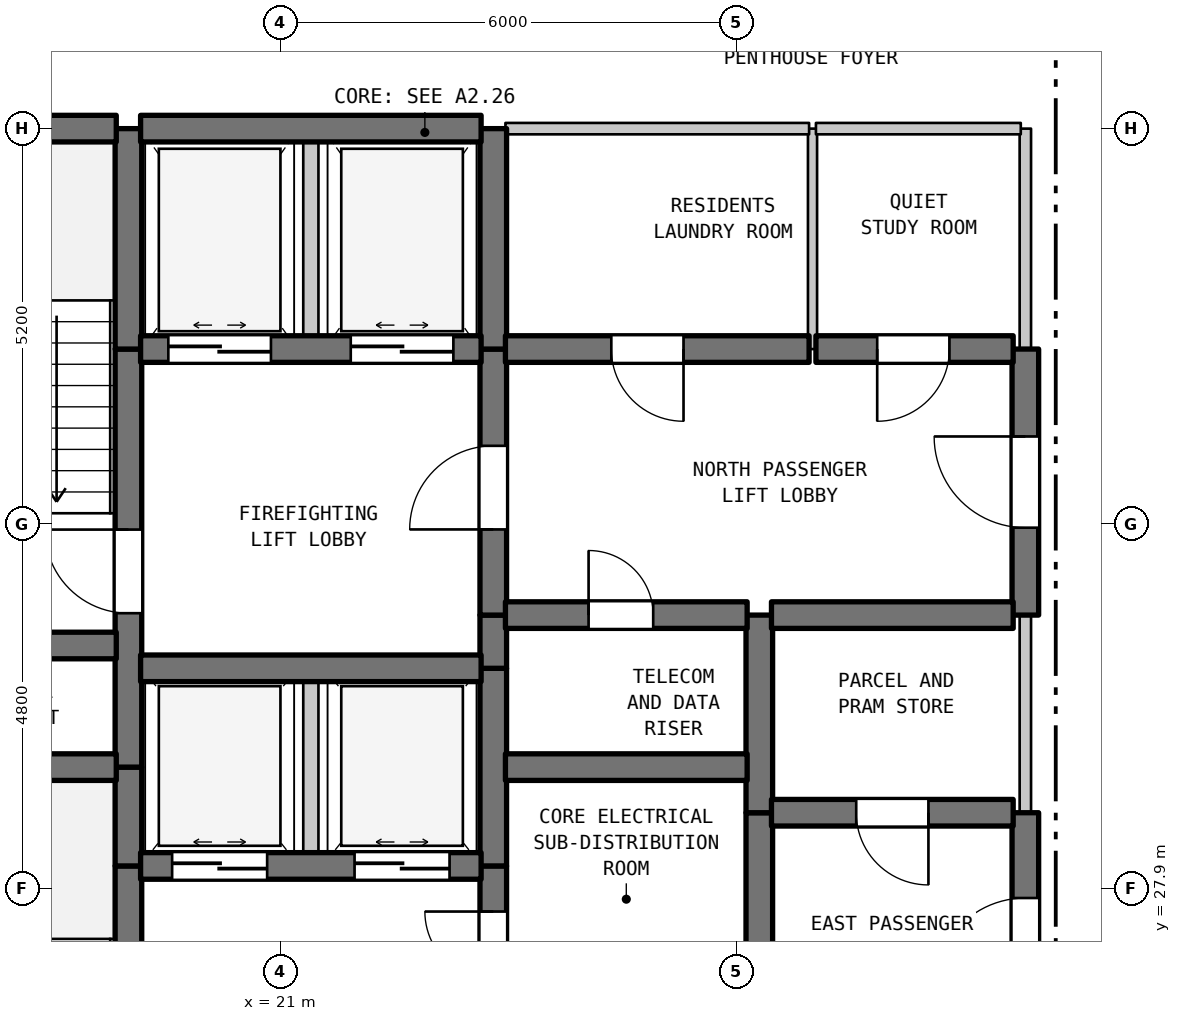
"""IFC4 building model, lengths in metres.
Left out: names, types, materials, properties, quantities, classifications, styles, units other than length and angle.
Written with IfcOpenShell. Run it as: python <this file> out.ifc"""

import sys

from ifc_helpers import new_model, si_unit, direction, frame, frame_2d, origin, place, context, subcontext, project, spatial, rectangle, extrude, element, fill, save


model = new_model("IFC4")
c1 = context("Model", 3, precision=1e-05, world=origin(), true_north=direction((0.0, 1.0)))
c2 = subcontext(c1, "Body", "Model", "MODEL_VIEW")
j1 = project(units=[si_unit("LENGTHUNIT", "METRE"), si_unit("PLANEANGLEUNIT", "RADIAN")], contexts=[c1])
p1 = place(None, origin())
s1 = spatial("IfcSite", under=j1, at=p1, CompositionType="ELEMENT")
p2 = place(p1, origin())
s2 = spatial("IfcBuilding", under=s1, at=p2, CompositionType="ELEMENT")
p3 = place(p2, frame((0.0, 0.0, 288.0)))
s3 = spatial("IfcBuildingStorey", under=s2, at=p3, CompositionType="ELEMENT", Elevation=288.0)
p4 = place(p3, frame((19.0, 22.7, 0.0), z_axis=(0.0, 0.0, 1.0), x_axis=(0.0, 1.0, 0.0)))
e1 = element("IfcWall", 1, at=p4, inside=s3, PredefinedType="SHEAR", context=c2, shape_type="SweptSolid", body=[
    extrude(rectangle(XDim=5.5, YDim=0.35, at=frame_2d((2.75, 0.0))), origin(), (0.0, 0.0, 1.0), 3.39),
])
p5 = place(p4, frame((0.631, 0.0, 0.0)))
e2 = element("IfcOpeningElement", 2, at=p5, cuts=e1, PredefinedType="OPENING", context=c2, shape_type="SweptSolid", body=[
    extrude(rectangle(XDim=1.1, YDim=2.15, at=frame_2d((0.55, 1.075))), frame((0.0, 0.185, 0.0), z_axis=(0.0, -1.0, 0.0), x_axis=(1.0, 0.0, 0.0)), (0.0, 0.0, 1.0), 0.37),
])
p6 = place(p3, frame((19.0, 28.2, 0.0), z_axis=(0.0, 0.0, 1.0), x_axis=(0.0, 1.0, 0.0)))
e3 = element("IfcWall", 3, at=p6, inside=s3, PredefinedType="SHEAR", context=c2, shape_type="SweptSolid", body=[
    extrude(rectangle(XDim=1.3, YDim=0.35, at=frame_2d((0.65, 0.0))), origin(), (0.0, 0.0, 1.0), 3.39),
])
p7 = place(p3, frame((19.0, 29.5, 0.0), z_axis=(0.0, 0.0, 1.0), x_axis=(0.0, 1.0, 0.0)))
e4 = element("IfcWall", 4, at=p7, inside=s3, PredefinedType="SHEAR", context=c2, shape_type="SweptSolid", body=[
    extrude(rectangle(XDim=5.5, YDim=0.35, at=frame_2d((2.75, 0.0))), origin(), (0.0, 0.0, 1.0), 3.39),
])
p8 = place(p7, frame((2.025, 0.0, 0.0)))
e5 = element("IfcOpeningElement", 5, at=p8, cuts=e4, PredefinedType="OPENING", context=c2, shape_type="SweptSolid", body=[
    extrude(rectangle(XDim=1.1, YDim=2.15, at=frame_2d((0.55, 1.075))), frame((0.0, 0.185, 0.0), z_axis=(0.0, -1.0, 0.0), x_axis=(1.0, 0.0, 0.0)), (0.0, 0.0, 1.0), 0.37),
])
p9 = place(p3, frame((19.0, 35.0, 0.0), z_axis=(0.0, 0.0, 1.0), x_axis=(0.0, 1.0, 0.0)))
e6 = element("IfcWall", 6, at=p9, inside=s3, PredefinedType="SHEAR", context=c2, shape_type="SweptSolid", body=[
    extrude(rectangle(XDim=2.9, YDim=0.35, at=frame_2d((1.45, 0.0))), origin(), (0.0, 0.0, 1.0), 3.39),
])
p10 = place(p3, frame((21.4, 28.2, 0.0), z_axis=(0.0, 0.0, 1.0), x_axis=(0.0, 1.0, 0.0)))
e7 = element("IfcWall", 7, at=p10, inside=s3, PredefinedType="STANDARD", context=c2, shape_type="SweptSolid", body=[
    extrude(rectangle(XDim=2.6, YDim=0.2, at=frame_2d((1.3, 0.0))), origin(), (0.0, 0.0, 1.0), 3.39),
])
p11 = place(p3, frame((21.4, 35.0, 0.0), z_axis=(0.0, 0.0, 1.0), x_axis=(0.0, 1.0, 0.0)))
e8 = element("IfcWall", 8, at=p11, inside=s3, PredefinedType="STANDARD", context=c2, shape_type="SweptSolid", body=[
    extrude(rectangle(XDim=2.9, YDim=0.2, at=frame_2d((1.45, 0.0))), origin(), (0.0, 0.0, 1.0), 3.39),
])
p12 = place(p3, frame((23.8, 26.1, 0.0), z_axis=(0.0, 0.0, 1.0), x_axis=(0.0, 1.0, 0.0)))
e9 = element("IfcWall", 9, at=p12, inside=s3, PredefinedType="SHEAR", context=c2, shape_type="SweptSolid", body=[
    extrude(rectangle(XDim=2.1, YDim=0.35, at=frame_2d((1.05, 0.0))), origin(), (0.0, 0.0, 1.0), 3.39),
])
p13 = place(p12, frame((0.6, 0.0, 0.0)))
e10 = element("IfcOpeningElement", 10, at=p13, cuts=e9, PredefinedType="OPENING", context=c2, shape_type="SweptSolid", body=[
    extrude(rectangle(XDim=0.9, YDim=2.15, at=frame_2d((0.45, 1.075))), frame((0.0, 0.185, 0.0), z_axis=(0.0, -1.0, 0.0), x_axis=(1.0, 0.0, 0.0)), (0.0, 0.0, 1.0), 0.37),
])
p14 = place(p3, frame((23.8, 28.2, 0.0), z_axis=(0.0, 0.0, 1.0), x_axis=(0.0, 1.0, 0.0)))
e11 = element("IfcWall", 11, at=p14, inside=s3, PredefinedType="SHEAR", context=c2, shape_type="SweptSolid", body=[
    extrude(rectangle(XDim=2.6, YDim=0.35, at=frame_2d((1.3, 0.0))), origin(), (0.0, 0.0, 1.0), 3.39),
])
p15 = place(p3, frame((23.8, 30.8, 0.0), z_axis=(0.0, 0.0, 1.0), x_axis=(0.0, 1.0, 0.0)))
e12 = element("IfcWall", 12, at=p15, inside=s3, PredefinedType="SHEAR", context=c2, shape_type="SweptSolid", body=[
    extrude(rectangle(XDim=0.7, YDim=0.35, at=frame_2d((0.35, 0.0))), origin(), (0.0, 0.0, 1.0), 3.39),
])
p16 = place(p3, frame((23.8, 31.5, 0.0), z_axis=(0.0, 0.0, 1.0), x_axis=(0.0, 1.0, 0.0)))
e13 = element("IfcWall", 13, at=p16, inside=s3, PredefinedType="SHEAR", context=c2, shape_type="SweptSolid", body=[
    extrude(rectangle(XDim=3.5, YDim=0.35, at=frame_2d((1.75, 0.0))), origin(), (0.0, 0.0, 1.0), 3.39),
])
p17 = place(p16, frame((1.127, 0.0, 0.0)))
e14 = element("IfcOpeningElement", 14, at=p17, cuts=e13, PredefinedType="OPENING", context=c2, shape_type="SweptSolid", body=[
    extrude(rectangle(XDim=1.1, YDim=2.15, at=frame_2d((0.55, 1.075))), frame((0.0, 0.185, 0.0), z_axis=(0.0, -1.0, 0.0), x_axis=(1.0, 0.0, 0.0)), (0.0, 0.0, 1.0), 0.37),
])
p18 = place(p3, frame((23.8, 35.0, 0.0), z_axis=(0.0, 0.0, 1.0), x_axis=(0.0, 1.0, 0.0)))
e15 = element("IfcWall", 15, at=p18, inside=s3, PredefinedType="SHEAR", context=c2, shape_type="SweptSolid", body=[
    extrude(rectangle(XDim=2.9, YDim=0.35, at=frame_2d((1.45, 0.0))), origin(), (0.0, 0.0, 1.0), 3.39),
])
p19 = place(p3, frame((27.3, 26.1, 0.0), z_axis=(0.0, 0.0, 1.0), x_axis=(0.0, 1.0, 0.0)))
e16 = element("IfcWall", 16, at=p19, inside=s3, PredefinedType="SHEAR", context=c2, shape_type="SweptSolid", body=[
    extrude(rectangle(XDim=2.8, YDim=0.35, at=frame_2d((1.4, 0.0))), origin(), (0.0, 0.0, 1.0), 3.39),
])
p20 = place(p3, frame((27.3, 28.9, 0.0), z_axis=(0.0, 0.0, 1.0), x_axis=(0.0, 1.0, 0.0)))
e17 = element("IfcWall", 17, at=p20, inside=s3, PredefinedType="SHEAR", context=c2, shape_type="SweptSolid", body=[
    extrude(rectangle(XDim=2.6, YDim=0.35, at=frame_2d((1.3, 0.0))), origin(), (0.0, 0.0, 1.0), 3.39),
])
p21 = place(p3, frame((28.0, 35.0, 0.0), z_axis=(0.0, 0.0, 1.0), x_axis=(0.0, 1.0, 0.0)))
e18 = element("IfcWall", 18, at=p21, inside=s3, PredefinedType="PARTITIONING", context=c2, shape_type="SweptSolid", body=[
    extrude(rectangle(XDim=2.9, YDim=0.12, at=frame_2d((1.45, 0.0))), origin(), (0.0, 0.0, 1.0), 3.39),
])
p22 = place(p3, frame((30.8, 25.6, 0.0), z_axis=(0.0, 0.0, 1.0), x_axis=(0.0, 1.0, 0.0)))
e19 = element("IfcWall", 19, at=p22, inside=s3, PredefinedType="SHEAR", context=c2, shape_type="SweptSolid", body=[
    extrude(rectangle(XDim=3.3, YDim=0.35, at=frame_2d((1.65, 0.0))), origin(), (0.0, 0.0, 1.0), 3.39),
])
p23 = place(p22, frame((0.978, 0.0, 0.0)))
e20 = element("IfcOpeningElement", 20, at=p23, cuts=e19, PredefinedType="OPENING", context=c2, shape_type="SweptSolid", body=[
    extrude(rectangle(XDim=1.2, YDim=2.2, at=frame_2d((0.6, 1.1))), frame((0.0, 0.185, 0.0), z_axis=(0.0, -1.0, 0.0), x_axis=(1.0, 0.0, 0.0)), (0.0, 0.0, 1.0), 0.37),
])
p24 = place(p3, frame((30.8, 28.9, 0.0), z_axis=(0.0, 0.0, 1.0), x_axis=(0.0, 1.0, 0.0)))
e21 = element("IfcWall", 21, at=p24, inside=s3, PredefinedType="STANDARD", context=c2, shape_type="SweptSolid", body=[
    extrude(rectangle(XDim=2.6, YDim=0.15, at=frame_2d((1.3, 0.0))), origin(), (0.0, 0.0, 1.0), 3.39),
])
p25 = place(p3, frame((30.8, 31.5, 0.0), z_axis=(0.0, 0.0, 1.0), x_axis=(0.0, 1.0, 0.0)))
e22 = element("IfcWall", 22, at=p25, inside=s3, PredefinedType="SHEAR", context=c2, shape_type="SweptSolid", body=[
    extrude(rectangle(XDim=3.5, YDim=0.35, at=frame_2d((1.75, 0.0))), origin(), (0.0, 0.0, 1.0), 3.39),
])
p26 = place(p25, frame((1.15, 0.0, 0.0)))
e23 = element("IfcOpeningElement", 23, at=p26, cuts=e22, PredefinedType="OPENING", context=c2, shape_type="SweptSolid", body=[
    extrude(rectangle(XDim=1.2, YDim=2.2, at=frame_2d((0.6, 1.1))), frame((0.0, 0.185, 0.0), z_axis=(0.0, -1.0, 0.0), x_axis=(1.0, 0.0, 0.0)), (0.0, 0.0, 1.0), 0.37),
])
p27 = place(p3, frame((30.8, 35.0, 0.0), z_axis=(0.0, 0.0, 1.0), x_axis=(0.0, 1.0, 0.0)))
e24 = element("IfcWall", 24, at=p27, inside=s3, PredefinedType="STANDARD", context=c2, shape_type="SweptSolid", body=[
    extrude(rectangle(XDim=2.9, YDim=0.15, at=frame_2d((1.45, 0.0))), origin(), (0.0, 0.0, 1.0), 3.39),
])
p28 = place(p3, frame((19.16, 28.2, 0.0), z_axis=(0.0, 0.0, 1.0), x_axis=(1.0, 0.0, 0.0)))
e25 = element("IfcWall", 25, at=p28, inside=s3, PredefinedType="SHEAR", context=c2, shape_type="SweptSolid", body=[
    extrude(rectangle(XDim=4.48, YDim=0.35, at=frame_2d((2.24, 0.0))), origin(), (0.0, 0.0, 1.0), 3.39),
])
p29 = place(p28, frame((0.415, 0.0, 0.0)))
e26 = element("IfcOpeningElement", 26, at=p29, cuts=e25, PredefinedType="OPENING", context=c2, shape_type="SweptSolid", body=[
    extrude(rectangle(XDim=1.25, YDim=2.2, at=frame_2d((0.625, 1.1))), frame((0.0, 0.185, 0.0), z_axis=(0.0, -1.0, 0.0), x_axis=(1.0, 0.0, 0.0)), (0.0, 0.0, 1.0), 0.37),
])
p30 = place(p28, frame((2.815, 0.0, 0.0)))
e27 = element("IfcOpeningElement", 27, at=p30, cuts=e25, PredefinedType="OPENING", context=c2, shape_type="SweptSolid", body=[
    extrude(rectangle(XDim=1.25, YDim=2.2, at=frame_2d((0.625, 1.1))), frame((0.0, 0.185, 0.0), z_axis=(0.0, -1.0, 0.0), x_axis=(1.0, 0.0, 0.0)), (0.0, 0.0, 1.0), 0.37),
])
p31 = place(p3, frame((27.46, 28.9, 0.0), z_axis=(0.0, 0.0, 1.0), x_axis=(1.0, 0.0, 0.0)))
e28 = element("IfcWall", 28, at=p31, inside=s3, PredefinedType="SHEAR", context=c2, shape_type="SweptSolid", body=[
    extrude(rectangle(XDim=3.18, YDim=0.35, at=frame_2d((1.59, 0.0))), origin(), (0.0, 0.0, 1.0), 3.39),
])
p32 = place(p31, frame((1.115, 0.0, 0.0)))
e29 = element("IfcOpeningElement", 29, at=p32, cuts=e28, PredefinedType="OPENING", context=c2, shape_type="SweptSolid", body=[
    extrude(rectangle(XDim=0.95, YDim=2.15, at=frame_2d((0.475, 1.075))), frame((0.0, 0.185, 0.0), z_axis=(0.0, -1.0, 0.0), x_axis=(1.0, 0.0, 0.0)), (0.0, 0.0, 1.0), 0.37),
])
p33 = place(p3, frame((15.16, 29.5, 0.0), z_axis=(0.0, 0.0, 1.0), x_axis=(1.0, 0.0, 0.0)))
e30 = element("IfcWall", 30, at=p33, inside=s3, PredefinedType="SHEAR", context=c2, shape_type="SweptSolid", body=[
    extrude(rectangle(XDim=3.68, YDim=0.35, at=frame_2d((1.84, 0.0))), origin(), (0.0, 0.0, 1.0), 3.39),
])
p34 = place(p3, frame((23.96, 29.5, 0.0), z_axis=(0.0, 0.0, 1.0), x_axis=(1.0, 0.0, 0.0)))
e31 = element("IfcWall", 31, at=p34, inside=s3, PredefinedType="SHEAR", context=c2, shape_type="SweptSolid", body=[
    extrude(rectangle(XDim=3.18, YDim=0.35, at=frame_2d((1.59, 0.0))), origin(), (0.0, 0.0, 1.0), 3.39),
])
p35 = place(p3, frame((19.16, 30.8, 0.0), z_axis=(0.0, 0.0, 1.0), x_axis=(1.0, 0.0, 0.0)))
e32 = element("IfcWall", 32, at=p35, inside=s3, PredefinedType="SHEAR", context=c2, shape_type="SweptSolid", body=[
    extrude(rectangle(XDim=4.48, YDim=0.35, at=frame_2d((2.24, 0.0))), origin(), (0.0, 0.0, 1.0), 3.39),
])
p36 = place(p3, frame((15.16, 31.1, 0.0), z_axis=(0.0, 0.0, 1.0), x_axis=(1.0, 0.0, 0.0)))
e33 = element("IfcWall", 33, at=p36, inside=s3, PredefinedType="SHEAR", context=c2, shape_type="SweptSolid", body=[
    extrude(rectangle(XDim=3.68, YDim=0.35, at=frame_2d((1.84, 0.0))), origin(), (0.0, 0.0, 1.0), 3.39),
])
p37 = place(p3, frame((23.96, 31.5, 0.0), z_axis=(0.0, 0.0, 1.0), x_axis=(1.0, 0.0, 0.0)))
e34 = element("IfcWall", 34, at=p37, inside=s3, PredefinedType="SHEAR", context=c2, shape_type="SweptSolid", body=[
    extrude(rectangle(XDim=3.18, YDim=0.35, at=frame_2d((1.59, 0.0))), origin(), (0.0, 0.0, 1.0), 3.39),
])
p38 = place(p37, frame((1.094, 0.0, 0.0)))
e35 = element("IfcOpeningElement", 35, at=p38, cuts=e34, PredefinedType="OPENING", context=c2, shape_type="SweptSolid", body=[
    extrude(rectangle(XDim=0.85, YDim=2.1, at=frame_2d((0.425, 1.05))), frame((0.0, 0.185, 0.0), z_axis=(0.0, -1.0, 0.0), x_axis=(1.0, 0.0, 0.0)), (0.0, 0.0, 1.0), 0.37),
])
p39 = place(p3, frame((27.46, 31.5, 0.0), z_axis=(0.0, 0.0, 1.0), x_axis=(1.0, 0.0, 0.0)))
e36 = element("IfcWall", 36, at=p39, inside=s3, PredefinedType="SHEAR", context=c2, shape_type="SweptSolid", body=[
    extrude(rectangle(XDim=3.18, YDim=0.35, at=frame_2d((1.59, 0.0))), origin(), (0.0, 0.0, 1.0), 3.39),
])
p40 = place(p3, frame((19.16, 35.0, 0.0), z_axis=(0.0, 0.0, 1.0), x_axis=(1.0, 0.0, 0.0)))
e37 = element("IfcWall", 37, at=p40, inside=s3, PredefinedType="SHEAR", context=c2, shape_type="SweptSolid", body=[
    extrude(rectangle(XDim=4.48, YDim=0.35, at=frame_2d((2.24, 0.0))), origin(), (0.0, 0.0, 1.0), 3.39),
])
p41 = place(p40, frame((0.365, 0.0, 0.0)))
e38 = element("IfcOpeningElement", 38, at=p41, cuts=e37, PredefinedType="OPENING", context=c2, shape_type="SweptSolid", body=[
    extrude(rectangle(XDim=1.35, YDim=2.2, at=frame_2d((0.675, 1.1))), frame((0.0, 0.185, 0.0), z_axis=(0.0, -1.0, 0.0), x_axis=(1.0, 0.0, 0.0)), (0.0, 0.0, 1.0), 0.37),
])
p42 = place(p40, frame((2.765, 0.0, 0.0)))
e39 = element("IfcOpeningElement", 39, at=p42, cuts=e37, PredefinedType="OPENING", context=c2, shape_type="SweptSolid", body=[
    extrude(rectangle(XDim=1.35, YDim=2.2, at=frame_2d((0.675, 1.1))), frame((0.0, 0.185, 0.0), z_axis=(0.0, -1.0, 0.0), x_axis=(1.0, 0.0, 0.0)), (0.0, 0.0, 1.0), 0.37),
])
p43 = place(p3, frame((23.96, 35.0, 0.0), z_axis=(0.0, 0.0, 1.0), x_axis=(1.0, 0.0, 0.0)))
e40 = element("IfcWall", 40, at=p43, inside=s3, PredefinedType="SHEAR", context=c2, shape_type="SweptSolid", body=[
    extrude(rectangle(XDim=3.995, YDim=0.35, at=frame_2d((1.998, 0.0))), origin(), (0.0, 0.0, 1.0), 3.39),
])
p44 = place(p43, frame((1.393, 0.0, 0.0)))
e41 = element("IfcOpeningElement", 41, at=p44, cuts=e40, PredefinedType="OPENING", context=c2, shape_type="SweptSolid", body=[
    extrude(rectangle(XDim=0.95, YDim=2.15, at=frame_2d((0.475, 1.075))), frame((0.0, 0.185, 0.0), z_axis=(0.0, -1.0, 0.0), x_axis=(1.0, 0.0, 0.0)), (0.0, 0.0, 1.0), 0.37),
])
p45 = place(p3, frame((28.045, 35.0, 0.0), z_axis=(0.0, 0.0, 1.0), x_axis=(1.0, 0.0, 0.0)))
e42 = element("IfcWall", 42, at=p45, inside=s3, PredefinedType="SHEAR", context=c2, shape_type="SweptSolid", body=[
    extrude(rectangle(XDim=2.595, YDim=0.35, at=frame_2d((1.297, 0.0))), origin(), (0.0, 0.0, 1.0), 3.39),
])
p46 = place(p45, frame((0.806, 0.0, 0.0)))
e43 = element("IfcOpeningElement", 43, at=p46, cuts=e42, PredefinedType="OPENING", context=c2, shape_type="SweptSolid", body=[
    extrude(rectangle(XDim=0.95, YDim=2.15, at=frame_2d((0.475, 1.075))), frame((0.0, 0.185, 0.0), z_axis=(0.0, -1.0, 0.0), x_axis=(1.0, 0.0, 0.0)), (0.0, 0.0, 1.0), 0.37),
])
p47 = place(p3, frame((15.16, 37.9, 0.0), z_axis=(0.0, 0.0, 1.0), x_axis=(1.0, 0.0, 0.0)))
e44 = element("IfcWall", 44, at=p47, inside=s3, PredefinedType="SHEAR", context=c2, shape_type="SweptSolid", body=[
    extrude(rectangle(XDim=3.68, YDim=0.35, at=frame_2d((1.84, 0.0))), origin(), (0.0, 0.0, 1.0), 3.39),
])
p48 = place(p3, frame((19.16, 37.9, 0.0), z_axis=(0.0, 0.0, 1.0), x_axis=(1.0, 0.0, 0.0)))
e45 = element("IfcWall", 45, at=p48, inside=s3, PredefinedType="SHEAR", context=c2, shape_type="SweptSolid", body=[
    extrude(rectangle(XDim=4.48, YDim=0.35, at=frame_2d((2.24, 0.0))), origin(), (0.0, 0.0, 1.0), 3.39),
])
p49 = place(p3, frame((23.96, 37.9, 0.0), z_axis=(0.0, 0.0, 1.0), x_axis=(1.0, 0.0, 0.0)))
e46 = element("IfcWall", 46, at=p49, inside=s3, PredefinedType="STANDARD", context=c2, shape_type="SweptSolid", body=[
    extrude(rectangle(XDim=3.995, YDim=0.15, at=frame_2d((1.998, 0.0))), origin(), (0.0, 0.0, 1.0), 2.89),
])
p50 = place(p3, frame((28.045, 37.9, 0.0), z_axis=(0.0, 0.0, 1.0), x_axis=(1.0, 0.0, 0.0)))
e47 = element("IfcWall", 47, at=p50, inside=s3, PredefinedType="STANDARD", context=c2, shape_type="SweptSolid", body=[
    extrude(rectangle(XDim=2.695, YDim=0.15, at=frame_2d((1.348, 0.0))), origin(), (0.0, 0.0, 1.0), 2.89),
])
p51 = place(p8, origin())
e48 = element("IfcDoor", 48, at=p51, inside=s3, OperationType="SINGLE_SWING_RIGHT", PredefinedType="DOOR", context=c2, shape_type="SweptSolid", body=[
    extrude(rectangle(XDim=1.1, YDim=2.15, at=frame_2d((0.55, 1.075))), frame((0.0, 0.025, 0.0), z_axis=(0.0, -1.0, 0.0), x_axis=(1.0, 0.0, 0.0)), (0.0, 0.0, 1.0), 0.05),
])
fill(e5, e48)
p52 = place(p13, origin())
e49 = element("IfcDoor", 49, at=p52, inside=s3, OperationType="SINGLE_SWING_RIGHT", PredefinedType="DOOR", context=c2, shape_type="SweptSolid", body=[
    extrude(rectangle(XDim=0.9, YDim=2.15, at=frame_2d((0.45, 1.075))), frame((0.0, 0.025, 0.0), z_axis=(0.0, -1.0, 0.0), x_axis=(1.0, 0.0, 0.0)), (0.0, 0.0, 1.0), 0.05),
])
fill(e10, e49)
p53 = place(p17, origin())
e50 = element("IfcDoor", 50, at=p53, inside=s3, OperationType="SINGLE_SWING_LEFT", PredefinedType="DOOR", context=c2, shape_type="SweptSolid", body=[
    extrude(rectangle(XDim=1.1, YDim=2.15, at=frame_2d((0.55, 1.075))), frame((0.0, 0.025, 0.0), z_axis=(0.0, -1.0, 0.0), x_axis=(1.0, 0.0, 0.0)), (0.0, 0.0, 1.0), 0.05),
])
fill(e14, e50)
p54 = place(p23, origin())
e51 = element("IfcDoor", 51, at=p54, inside=s3, OperationType="SINGLE_SWING_LEFT", PredefinedType="DOOR", context=c2, shape_type="SweptSolid", body=[
    extrude(rectangle(XDim=1.2, YDim=2.2, at=frame_2d((0.6, 1.1))), frame((0.0, 0.025, 0.0), z_axis=(0.0, -1.0, 0.0), x_axis=(1.0, 0.0, 0.0)), (0.0, 0.0, 1.0), 0.05),
])
fill(e20, e51)
p55 = place(p26, origin())
e52 = element("IfcDoor", 52, at=p55, inside=s3, OperationType="SINGLE_SWING_RIGHT", PredefinedType="DOOR", context=c2, shape_type="SweptSolid", body=[
    extrude(rectangle(XDim=1.2, YDim=2.2, at=frame_2d((0.6, 1.1))), frame((0.0, 0.025, 0.0), z_axis=(0.0, -1.0, 0.0), x_axis=(1.0, 0.0, 0.0)), (0.0, 0.0, 1.0), 0.05),
])
fill(e23, e52)
p56 = place(p29, origin())
e53 = element("IfcDoor", 53, at=p56, inside=s3, OperationType="DOUBLE_DOOR_SLIDING", PredefinedType="DOOR", context=c2, shape_type="SweptSolid", body=[
    extrude(rectangle(XDim=1.25, YDim=2.2, at=frame_2d((0.625, 1.1))), frame((0.0, 0.025, 0.0), z_axis=(0.0, -1.0, 0.0), x_axis=(1.0, 0.0, 0.0)), (0.0, 0.0, 1.0), 0.05),
])
fill(e26, e53)
p57 = place(p30, origin())
e54 = element("IfcDoor", 54, at=p57, inside=s3, OperationType="DOUBLE_DOOR_SLIDING", PredefinedType="DOOR", context=c2, shape_type="SweptSolid", body=[
    extrude(rectangle(XDim=1.25, YDim=2.2, at=frame_2d((0.625, 1.1))), frame((0.0, 0.025, 0.0), z_axis=(0.0, -1.0, 0.0), x_axis=(1.0, 0.0, 0.0)), (0.0, 0.0, 1.0), 0.05),
])
fill(e27, e54)
p58 = place(p32, frame((0.95, 0.0, 0.0), z_axis=(0.0, 0.0, 1.0), x_axis=(-1.0, 0.0, 0.0)))
e55 = element("IfcDoor", 55, at=p58, inside=s3, OperationType="SINGLE_SWING_RIGHT", PredefinedType="DOOR", context=c2, shape_type="SweptSolid", body=[
    extrude(rectangle(XDim=0.95, YDim=2.15, at=frame_2d((0.475, 1.075))), frame((0.0, 0.025, 0.0), z_axis=(0.0, -1.0, 0.0), x_axis=(1.0, 0.0, 0.0)), (0.0, 0.0, 1.0), 0.05),
])
fill(e29, e55)
p59 = place(p38, origin())
e56 = element("IfcDoor", 56, at=p59, inside=s3, OperationType="SINGLE_SWING_LEFT", PredefinedType="DOOR", context=c2, shape_type="SweptSolid", body=[
    extrude(rectangle(XDim=0.85, YDim=2.1, at=frame_2d((0.425, 1.05))), frame((0.0, 0.025, 0.0), z_axis=(0.0, -1.0, 0.0), x_axis=(1.0, 0.0, 0.0)), (0.0, 0.0, 1.0), 0.05),
])
fill(e35, e56)
p60 = place(p41, origin())
e57 = element("IfcDoor", 57, at=p60, inside=s3, OperationType="DOUBLE_DOOR_SLIDING", PredefinedType="DOOR", context=c2, shape_type="SweptSolid", body=[
    extrude(rectangle(XDim=1.35, YDim=2.2, at=frame_2d((0.675, 1.1))), frame((0.0, 0.025, 0.0), z_axis=(0.0, -1.0, 0.0), x_axis=(1.0, 0.0, 0.0)), (0.0, 0.0, 1.0), 0.05),
])
fill(e38, e57)
p61 = place(p42, origin())
e58 = element("IfcDoor", 58, at=p61, inside=s3, OperationType="DOUBLE_DOOR_SLIDING", PredefinedType="DOOR", context=c2, shape_type="SweptSolid", body=[
    extrude(rectangle(XDim=1.35, YDim=2.2, at=frame_2d((0.675, 1.1))), frame((0.0, 0.025, 0.0), z_axis=(0.0, -1.0, 0.0), x_axis=(1.0, 0.0, 0.0)), (0.0, 0.0, 1.0), 0.05),
])
fill(e39, e58)
p62 = place(p44, frame((0.95, 0.0, 0.0), z_axis=(0.0, 0.0, 1.0), x_axis=(-1.0, 0.0, 0.0)))
e59 = element("IfcDoor", 59, at=p62, inside=s3, OperationType="SINGLE_SWING_RIGHT", PredefinedType="DOOR", context=c2, shape_type="SweptSolid", body=[
    extrude(rectangle(XDim=0.95, YDim=2.15, at=frame_2d((0.475, 1.075))), frame((0.0, 0.025, 0.0), z_axis=(0.0, -1.0, 0.0), x_axis=(1.0, 0.0, 0.0)), (0.0, 0.0, 1.0), 0.05),
])
fill(e41, e59)
p63 = place(p46, frame((0.95, 0.0, 0.0), z_axis=(0.0, 0.0, 1.0), x_axis=(-1.0, 0.0, 0.0)))
e60 = element("IfcDoor", 60, at=p63, inside=s3, OperationType="SINGLE_SWING_LEFT", PredefinedType="DOOR", context=c2, shape_type="SweptSolid", body=[
    extrude(rectangle(XDim=0.95, YDim=2.15, at=frame_2d((0.475, 1.075))), frame((0.0, 0.025, 0.0), z_axis=(0.0, -1.0, 0.0), x_axis=(1.0, 0.0, 0.0)), (0.0, 0.0, 1.0), 0.05),
])
fill(e43, e60)
save(model, sys.argv[1])
